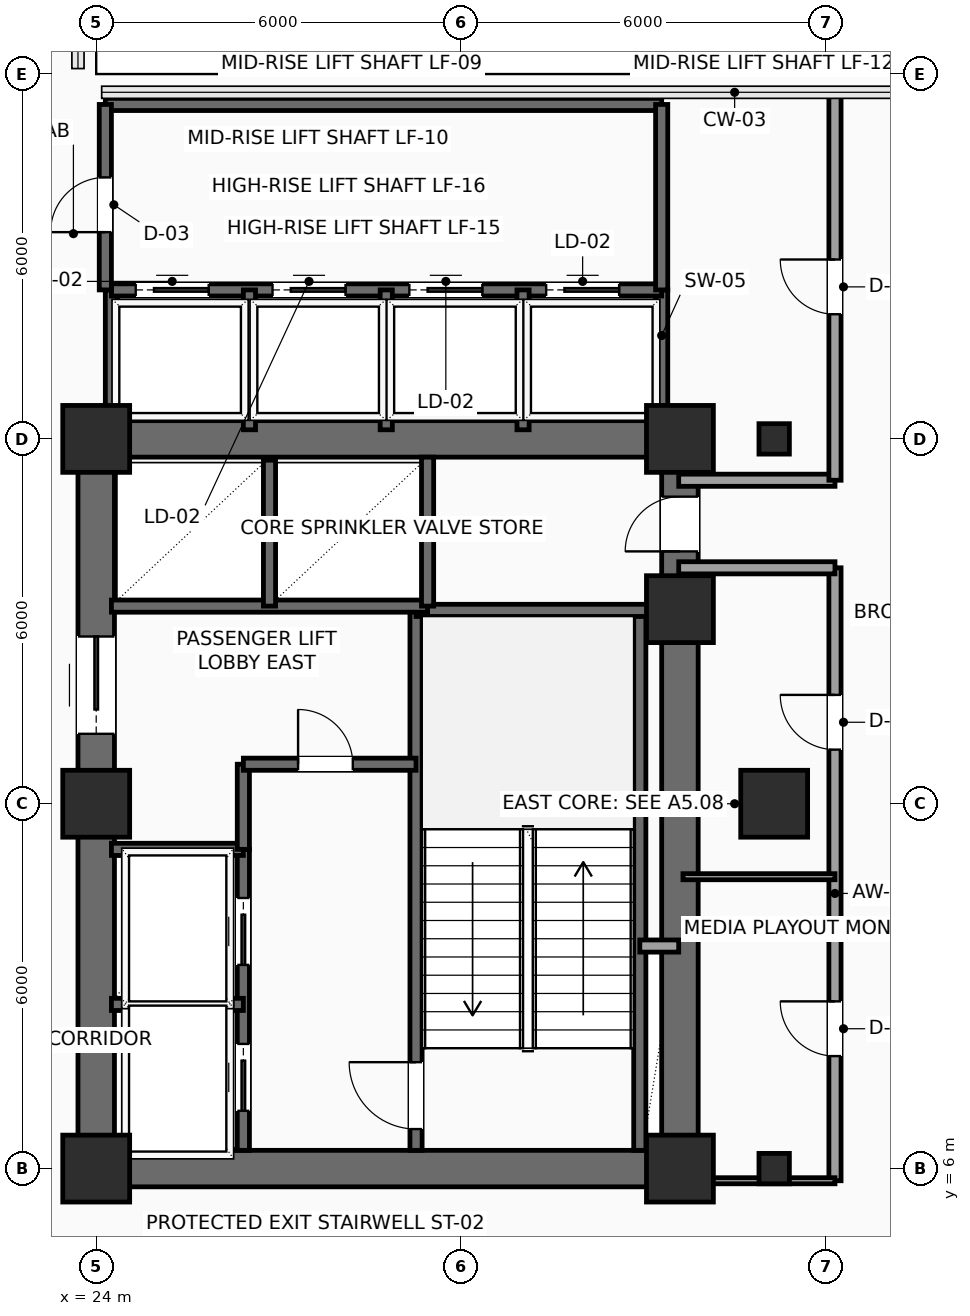
"""IFC4 building model, lengths in metres.
Left out: names, types, materials, properties, quantities, classifications, styles, units other than length and angle.
Written with IfcOpenShell. Run it as: python <this file> out.ifc"""

import sys

from ifc_helpers import new_model, si_unit, direction, frame, frame_2d, origin, origin_2d, place, context, subcontext, project, spatial, rectangle, hollow_rectangle, extrude, element, fill, save


model = new_model("IFC4")
c1 = context("Model", 3, precision=1e-05, world=origin(), true_north=direction((0.0, 1.0)))
c2 = subcontext(c1, "Body", "Model", "MODEL_VIEW")
j1 = project(units=[si_unit("LENGTHUNIT", "METRE"), si_unit("PLANEANGLEUNIT", "RADIAN")], contexts=[c1])
p1 = place(None, origin())
s1 = spatial("IfcSite", under=j1, at=p1, CompositionType="ELEMENT")
p2 = place(p1, origin())
s2 = spatial("IfcBuilding", under=s1, at=p2, CompositionType="ELEMENT")
p3 = place(p2, frame((0.0, 0.0, 141.9)))
s3 = spatial("IfcBuildingStorey", under=s2, at=p3, CompositionType="ELEMENT", Elevation=141.9)
for number, where, z_axis, x_axis in (
    (1, (24.0, 6.0, 0.0), (0.0, 0.0, 1.0), (1.0, 0.0, 0.0)),
    (2, (24.0, 12.0, 0.0), (0.0, 0.0, 1.0), (1.0, 0.0, 0.0)),
    (3, (24.0, 18.0, 0.0), (0.0, 0.0, 1.0), (1.0, 0.0, 0.0)),
    (4, (33.6, 6.0, 0.0), (0.0, 0.0, 1.0), (1.0, 0.0, 0.0)),
    (5, (33.6, 15.2, 0.0), (0.0, 0.0, 1.0), (1.0, 0.0, 0.0)),
    (6, (33.6, 18.0, 0.0), (0.0, 0.0, 1.0), (1.0, 0.0, 0.0)),
):
    element("IfcColumn", number, at=place(p3, frame(where, z_axis=z_axis, x_axis=x_axis)), inside=s3, PredefinedType="COLUMN", context=c2, shape_type="SweptSolid", body=[
        extrude(rectangle(XDim=1.1, YDim=1.1, at=origin_2d()), origin(), (0.0, 0.0, 1.0), 3.75),
    ])
p4 = place(p3, frame((35.15, 6.0, 0.0), z_axis=(0.0, 0.0, 1.0), x_axis=(1.0, 0.0, 0.0)))
e7 = element("IfcColumn", 7, at=p4, inside=s3, PredefinedType="COLUMN", context=c2, shape_type="SweptSolid", body=[
    extrude(hollow_rectangle(XDim=0.5, YDim=0.5, WallThickness=0.025, InnerFilletRadius=0.025, OuterFilletRadius=0.04, at=origin_2d()), origin(), (0.0, 0.0, 1.0), 3.75),
])
p5 = place(p3, frame((35.15, 12.0, 0.0), z_axis=(0.0, 0.0, 1.0), x_axis=(1.0, 0.0, 0.0)))
e8 = element("IfcColumn", 8, at=p5, inside=s3, PredefinedType="COLUMN", context=c2, shape_type="SweptSolid", body=[
    extrude(rectangle(XDim=1.1, YDim=1.1, at=origin_2d()), origin(), (0.0, 0.0, 1.0), 3.75),
])
p6 = place(p3, frame((35.15, 18.0, 0.0), z_axis=(0.0, 0.0, 1.0), x_axis=(1.0, 0.0, 0.0)))
e9 = element("IfcColumn", 9, at=p6, inside=s3, PredefinedType="COLUMN", context=c2, shape_type="SweptSolid", body=[
    extrude(hollow_rectangle(XDim=0.5, YDim=0.5, WallThickness=0.025, InnerFilletRadius=0.025, OuterFilletRadius=0.04, at=origin_2d()), origin(), (0.0, 0.0, 1.0), 3.75),
])
for number, where, z_axis, x_axis in (
    (10, (24.0, 6.0, 0.0), (0.0, 0.0, 1.0), (1.0, 0.0, 0.0)),
    (11, (24.0, 18.0, 0.0), (0.0, 0.0, 1.0), (1.0, 0.0, 0.0)),
):
    element("IfcWall", number, at=place(p3, frame(where, z_axis=z_axis, x_axis=x_axis)), inside=s3, PredefinedType="SHEAR", context=c2, shape_type="SweptSolid", body=[
        extrude(rectangle(XDim=9.6, YDim=0.6, at=frame_2d((4.8, 0.0))), origin(), (0.0, 0.0, 1.0), 3.525),
    ])
p7 = place(p3, frame((24.0, 6.0, 0.0), z_axis=(0.0, 0.0, 1.0), x_axis=(0.0, 1.0, 0.0)))
e12 = element("IfcWall", 12, at=p7, inside=s3, PredefinedType="SHEAR", context=c2, shape_type="SweptSolid", body=[
    extrude(rectangle(XDim=12.0, YDim=0.6, at=frame_2d((6.0, 0.0))), origin(), (0.0, 0.0, 1.0), 3.525),
])
p8 = place(p7, frame((7.15, 0.0, 0.0)))
e13 = element("IfcOpeningElement", 13, at=p8, cuts=e12, PredefinedType="OPENING", context=c2, shape_type="SweptSolid", body=[
    extrude(rectangle(XDim=1.6, YDim=2.3, at=frame_2d((0.8, 1.15))), frame((0.0, 0.31, 0.0), z_axis=(0.0, -1.0, 0.0), x_axis=(1.0, 0.0, 0.0)), (0.0, 0.0, 1.0), 0.62),
])
p9 = place(p3, frame((33.6, 6.0, 0.0), z_axis=(0.0, 0.0, 1.0), x_axis=(0.0, 1.0, 0.0)))
e14 = element("IfcWall", 14, at=p9, inside=s3, PredefinedType="SHEAR", context=c2, shape_type="SweptSolid", body=[
    extrude(rectangle(XDim=12.0, YDim=0.6, at=frame_2d((6.0, 0.0))), origin(), (0.0, 0.0, 1.0), 3.525),
])
p10 = place(p9, frame((10.15, 0.0, 0.0)))
e15 = element("IfcOpeningElement", 15, at=p10, cuts=e14, PredefinedType="OPENING", context=c2, shape_type="SweptSolid", body=[
    extrude(rectangle(XDim=0.9, YDim=2.15, at=frame_2d((0.45, 1.075))), frame((0.0, 0.31, 0.0), z_axis=(0.0, -1.0, 0.0), x_axis=(1.0, 0.0, 0.0)), (0.0, 0.0, 1.0), 0.62),
])
p11 = place(p3, frame((29.26, 6.3, 0.0), z_axis=(0.0, 0.0, 1.0), x_axis=(0.0, 1.0, 0.0)))
e16 = element("IfcWall", 16, at=p11, inside=s3, PredefinedType="SHEAR", context=c2, shape_type="SweptSolid", body=[
    extrude(rectangle(XDim=8.88, YDim=0.2, at=frame_2d((4.44, 0.0))), origin(), (0.0, 0.0, 1.0), 3.525),
])
p12 = place(p11, frame((0.35, 0.0, 0.0)))
e17 = element("IfcOpeningElement", 17, at=p12, cuts=e16, PredefinedType="OPENING", context=c2, shape_type="SweptSolid", body=[
    extrude(rectangle(XDim=1.1, YDim=2.2, at=frame_2d((0.55, 1.1))), frame((0.0, 0.11, 0.0), z_axis=(0.0, -1.0, 0.0), x_axis=(1.0, 0.0, 0.0)), (0.0, 0.0, 1.0), 0.22),
])
p13 = place(p3, frame((32.94, 6.3, 0.0), z_axis=(0.0, 0.0, 1.0), x_axis=(0.0, 1.0, 0.0)))
e18 = element("IfcWall", 18, at=p13, inside=s3, PredefinedType="SHEAR", context=c2, shape_type="SweptSolid", body=[
    extrude(rectangle(XDim=8.88, YDim=0.2, at=frame_2d((4.44, 0.0))), origin(), (0.0, 0.0, 1.0), 3.525),
])
p14 = place(p3, frame((29.26, 15.18, 0.0), z_axis=(0.0, 0.0, 1.0), x_axis=(1.0, 0.0, 0.0)))
e19 = element("IfcWall", 19, at=p14, inside=s3, PredefinedType="SHEAR", context=c2, shape_type="SweptSolid", body=[
    extrude(rectangle(XDim=4.04, YDim=0.2, at=frame_2d((2.02, 0.0))), origin(), (0.0, 0.0, 1.0), 3.525),
])
p15 = place(p3, frame((26.42, 6.3, 0.0), z_axis=(0.0, 0.0, 1.0), x_axis=(0.0, 1.0, 0.0)))
e20 = element("IfcWall", 20, at=p15, inside=s3, PredefinedType="SHEAR", context=c2, shape_type="SweptSolid", body=[
    extrude(rectangle(XDim=4.95, YDim=0.2, at=frame_2d((2.475, 0.0))), origin(), (0.0, 0.0, 1.0), 3.525),
])
p16 = place(p15, frame((0.65, 0.0, 0.0)))
e21 = element("IfcOpeningElement", 21, at=p16, cuts=e20, PredefinedType="OPENING", context=c2, shape_type="SweptSolid", body=[
    extrude(rectangle(XDim=1.1, YDim=2.2, at=frame_2d((0.55, 1.1))), frame((0.0, 0.11, 0.0), z_axis=(0.0, -1.0, 0.0), x_axis=(1.0, 0.0, 0.0)), (0.0, 0.0, 1.0), 0.22),
])
p17 = place(p15, frame((3.05, 0.0, 0.0)))
e22 = element("IfcOpeningElement", 22, at=p17, cuts=e20, PredefinedType="OPENING", context=c2, shape_type="SweptSolid", body=[
    extrude(rectangle(XDim=1.1, YDim=2.2, at=frame_2d((0.55, 1.1))), frame((0.0, 0.11, 0.0), z_axis=(0.0, -1.0, 0.0), x_axis=(1.0, 0.0, 0.0)), (0.0, 0.0, 1.0), 0.22),
])
for number, where, z_axis, x_axis in (
    (23, (24.25, 8.7, 0.0), (0.0, 0.0, 1.0), (1.0, 0.0, 0.0)),
    (24, (24.25, 11.25, 0.0), (0.0, 0.0, 1.0), (1.0, 0.0, 0.0)),
):
    element("IfcWall", number, at=place(p3, frame(where, z_axis=z_axis, x_axis=x_axis)), inside=s3, PredefinedType="SHEAR", context=c2, shape_type="SweptSolid", body=[
        extrude(rectangle(XDim=2.17, YDim=0.2, at=frame_2d((1.085, 0.0))), origin(), (0.0, 0.0, 1.0), 3.525),
    ])
p18 = place(p3, frame((26.42, 11.25, 0.0), z_axis=(0.0, 0.0, 1.0), x_axis=(0.0, 1.0, 0.0)))
e25 = element("IfcWall", 25, at=p18, inside=s3, PredefinedType="SHEAR", context=c2, shape_type="SweptSolid", body=[
    extrude(rectangle(XDim=1.4, YDim=0.2, at=frame_2d((0.7, 0.0))), origin(), (0.0, 0.0, 1.0), 3.525),
])
p19 = place(p3, frame((26.42, 12.65, 0.0), z_axis=(0.0, 0.0, 1.0), x_axis=(1.0, 0.0, 0.0)))
e26 = element("IfcWall", 26, at=p19, inside=s3, PredefinedType="SHEAR", context=c2, shape_type="SweptSolid", body=[
    extrude(rectangle(XDim=2.84, YDim=0.2, at=frame_2d((1.42, 0.0))), origin(), (0.0, 0.0, 1.0), 3.525),
])
p20 = place(p19, frame((0.9, 0.0, 0.0)))
e27 = element("IfcOpeningElement", 27, at=p20, cuts=e26, PredefinedType="OPENING", context=c2, shape_type="SweptSolid", body=[
    extrude(rectangle(XDim=0.9, YDim=2.15, at=frame_2d((0.45, 1.075))), frame((0.0, 0.11, 0.0), z_axis=(0.0, -1.0, 0.0), x_axis=(1.0, 0.0, 0.0)), (0.0, 0.0, 1.0), 0.22),
])
p21 = place(p3, frame((32.94, 9.66, 0.0), z_axis=(0.0, 0.0, 1.0), x_axis=(1.0, 0.0, 0.0)))
e28 = element("IfcWall", 28, at=p21, inside=s3, PredefinedType="SOLIDWALL", context=c2, shape_type="SweptSolid", body=[
    extrude(rectangle(XDim=0.64, YDim=0.2, at=frame_2d((0.32, 0.0))), origin(), (0.0, 0.0, 1.0), 3.525),
])
p22 = place(p3, frame((24.25, 15.25, 0.0), z_axis=(0.0, 0.0, 1.0), x_axis=(1.0, 0.0, 0.0)))
e29 = element("IfcWall", 29, at=p22, inside=s3, PredefinedType="SHEAR", context=c2, shape_type="SweptSolid", body=[
    extrude(rectangle(XDim=5.2, YDim=0.2, at=frame_2d((2.6, 0.0))), origin(), (0.0, 0.0, 1.0), 3.525),
])
p23 = place(p3, frame((26.85, 15.25, 0.0), z_axis=(0.0, 0.0, 1.0), x_axis=(0.0, 1.0, 0.0)))
e30 = element("IfcWall", 30, at=p23, inside=s3, PredefinedType="SHEAR", context=c2, shape_type="SweptSolid", body=[
    extrude(rectangle(XDim=2.4, YDim=0.2, at=frame_2d((1.2, 0.0))), origin(), (0.0, 0.0, 1.0), 3.525),
])
p24 = place(p3, frame((29.45, 15.25, 0.0), z_axis=(0.0, 0.0, 1.0), x_axis=(0.0, 1.0, 0.0)))
e31 = element("IfcWall", 31, at=p24, inside=s3, PredefinedType="SHEAR", context=c2, shape_type="SweptSolid", body=[
    extrude(rectangle(XDim=2.45, YDim=0.2, at=frame_2d((1.225, 0.0))), origin(), (0.0, 0.0, 1.0), 3.525),
])
for number, where, z_axis, x_axis in (
    (32, (33.3, 18.1, 0.0), (0.0, 0.0, 1.0), (0.0, 1.0, 0.0)),
    (33, (24.25, 18.1, 0.0), (0.0, 0.0, 1.0), (0.0, 1.0, 0.0)),
):
    element("IfcWall", number, at=place(p3, frame(where, z_axis=z_axis, x_axis=x_axis)), inside=s3, PredefinedType="SHEAR", context=c2, shape_type="SweptSolid", body=[
        extrude(rectangle(XDim=2.35, YDim=0.2, at=frame_2d((1.175, 0.0))), origin(), (0.0, 0.0, 1.0), 3.525),
    ])
p25 = place(p3, frame((24.25, 20.45, 0.0), z_axis=(0.0, 0.0, 1.0), x_axis=(1.0, 0.0, 0.0)))
e34 = element("IfcWall", 34, at=p25, inside=s3, PredefinedType="SHEAR", context=c2, shape_type="SweptSolid", body=[
    extrude(rectangle(XDim=9.05, YDim=0.2, at=frame_2d((4.525, 0.0))), origin(), (0.0, 0.0, 1.0), 3.525),
])
p26 = place(p25, frame((0.4, 0.0, 0.0)))
e35 = element("IfcOpeningElement", 35, at=p26, cuts=e34, PredefinedType="OPENING", context=c2, shape_type="SweptSolid", body=[
    extrude(rectangle(XDim=1.2, YDim=2.2, at=frame_2d((0.6, 1.1))), frame((0.0, 0.11, 0.0), z_axis=(0.0, -1.0, 0.0), x_axis=(1.0, 0.0, 0.0)), (0.0, 0.0, 1.0), 0.22),
])
p27 = place(p25, frame((2.65, 0.0, 0.0)))
e36 = element("IfcOpeningElement", 36, at=p27, cuts=e34, PredefinedType="OPENING", context=c2, shape_type="SweptSolid", body=[
    extrude(rectangle(XDim=1.2, YDim=2.2, at=frame_2d((0.6, 1.1))), frame((0.0, 0.11, 0.0), z_axis=(0.0, -1.0, 0.0), x_axis=(1.0, 0.0, 0.0)), (0.0, 0.0, 1.0), 0.22),
])
p28 = place(p25, frame((4.9, 0.0, 0.0)))
e37 = element("IfcOpeningElement", 37, at=p28, cuts=e34, PredefinedType="OPENING", context=c2, shape_type="SweptSolid", body=[
    extrude(rectangle(XDim=1.2, YDim=2.2, at=frame_2d((0.6, 1.1))), frame((0.0, 0.11, 0.0), z_axis=(0.0, -1.0, 0.0), x_axis=(1.0, 0.0, 0.0)), (0.0, 0.0, 1.0), 0.22),
])
p29 = place(p25, frame((7.15, 0.0, 0.0)))
e38 = element("IfcOpeningElement", 38, at=p29, cuts=e34, PredefinedType="OPENING", context=c2, shape_type="SweptSolid", body=[
    extrude(rectangle(XDim=1.2, YDim=2.2, at=frame_2d((0.6, 1.1))), frame((0.0, 0.11, 0.0), z_axis=(0.0, -1.0, 0.0), x_axis=(1.0, 0.0, 0.0)), (0.0, 0.0, 1.0), 0.22),
])
for number, where, z_axis, x_axis in (
    (39, (26.52, 18.15, 0.0), (0.0, 0.0, 1.0), (0.0, 1.0, 0.0)),
    (40, (28.77, 18.15, 0.0), (0.0, 0.0, 1.0), (0.0, 1.0, 0.0)),
    (41, (31.02, 18.15, 0.0), (0.0, 0.0, 1.0), (0.0, 1.0, 0.0)),
):
    element("IfcWall", number, at=place(p3, frame(where, z_axis=z_axis, x_axis=x_axis)), inside=s3, PredefinedType="SHEAR", context=c2, shape_type="SweptSolid", body=[
        extrude(rectangle(XDim=2.3, YDim=0.2, at=frame_2d((1.15, 0.0))), origin(), (0.0, 0.0, 1.0), 3.525),
    ])
p30 = place(p3, frame((24.15, 23.5, 0.0), z_axis=(0.0, 0.0, 1.0), x_axis=(1.0, 0.0, 0.0)))
e42 = element("IfcWall", 42, at=p30, inside=s3, PredefinedType="SHEAR", context=c2, shape_type="SweptSolid", body=[
    extrude(rectangle(XDim=9.15, YDim=0.2, at=frame_2d((4.575, 0.0))), origin(), (0.0, 0.0, 1.0), 3.525),
])
p31 = place(p3, frame((33.3, 20.45, 0.0), z_axis=(0.0, 0.0, 1.0), x_axis=(0.0, 1.0, 0.0)))
e43 = element("IfcWall", 43, at=p31, inside=s3, PredefinedType="SHEAR", context=c2, shape_type="SweptSolid", body=[
    extrude(rectangle(XDim=3.05, YDim=0.2, at=frame_2d((1.525, 0.0))), origin(), (0.0, 0.0, 1.0), 3.525),
])
p32 = place(p3, frame((24.15, 20.45, 0.0), z_axis=(0.0, 0.0, 1.0), x_axis=(0.0, 1.0, 0.0)))
e44 = element("IfcWall", 44, at=p32, inside=s3, PredefinedType="SHEAR", context=c2, shape_type="SweptSolid", body=[
    extrude(rectangle(XDim=3.05, YDim=0.2, at=frame_2d((1.525, 0.0))), origin(), (0.0, 0.0, 1.0), 3.525),
])
p33 = place(p32, frame((0.95, 0.0, 0.0)))
e45 = element("IfcOpeningElement", 45, at=p33, cuts=e44, PredefinedType="OPENING", context=c2, shape_type="SweptSolid", body=[
    extrude(rectangle(XDim=0.9, YDim=2.15, at=frame_2d((0.45, 1.075))), frame((0.0, 0.11, 0.0), z_axis=(0.0, -1.0, 0.0), x_axis=(1.0, 0.0, 0.0)), (0.0, 0.0, 1.0), 0.22),
])
p34 = place(p3, frame((36.15, 5.8, 0.0), z_axis=(0.0, 0.0, 1.0), x_axis=(0.0, 1.0, 0.0)))
e46 = element("IfcWall", 46, at=p34, inside=s3, PredefinedType="PARTITIONING", context=c2, shape_type="SweptSolid", body=[
    extrude(rectangle(XDim=10.08, YDim=0.2, at=frame_2d((5.04, 0.0))), origin(), (0.0, 0.0, 1.0), 3.525),
])
p35 = place(p34, frame((2.05, 0.0, 0.0)))
e47 = element("IfcOpeningElement", 47, at=p35, cuts=e46, PredefinedType="OPENING", context=c2, shape_type="SweptSolid", body=[
    extrude(rectangle(XDim=0.9, YDim=2.1, at=frame_2d((0.45, 1.05))), frame((0.0, 0.11, 0.0), z_axis=(0.0, -1.0, 0.0), x_axis=(1.0, 0.0, 0.0)), (0.0, 0.0, 1.0), 0.22),
])
p36 = place(p34, frame((7.09, 0.0, 0.0)))
e48 = element("IfcOpeningElement", 48, at=p36, cuts=e46, PredefinedType="OPENING", context=c2, shape_type="SweptSolid", body=[
    extrude(rectangle(XDim=0.9, YDim=2.1, at=frame_2d((0.45, 1.05))), frame((0.0, 0.11, 0.0), z_axis=(0.0, -1.0, 0.0), x_axis=(1.0, 0.0, 0.0)), (0.0, 0.0, 1.0), 0.22),
])
for number, where, z_axis, x_axis in (
    (49, (36.15, 15.88, 0.0), (0.0, 0.0, 1.0), (-1.0, 0.0, 0.0)),
    (50, (33.58, 17.32, 0.0), (0.0, 0.0, 1.0), (1.0, 0.0, 0.0)),
):
    element("IfcWall", number, at=place(p3, frame(where, z_axis=z_axis, x_axis=x_axis)), inside=s3, PredefinedType="PARTITIONING", context=c2, shape_type="SweptSolid", body=[
        extrude(rectangle(XDim=2.57, YDim=0.2, at=frame_2d((1.285, 0.0))), origin(), (0.0, 0.0, 1.0), 3.525),
    ])
p37 = place(p3, frame((36.15, 17.32, 0.0), z_axis=(0.0, 0.0, 1.0), x_axis=(0.0, 1.0, 0.0)))
e51 = element("IfcWall", 51, at=p37, inside=s3, PredefinedType="PARTITIONING", context=c2, shape_type="SweptSolid", body=[
    extrude(rectangle(XDim=6.38, YDim=0.2, at=frame_2d((3.19, 0.0))), origin(), (0.0, 0.0, 1.0), 3.525),
])
p38 = place(p37, frame((2.73, 0.0, 0.0)))
e52 = element("IfcOpeningElement", 52, at=p38, cuts=e51, PredefinedType="OPENING", context=c2, shape_type="SweptSolid", body=[
    extrude(rectangle(XDim=0.9, YDim=2.1, at=frame_2d((0.45, 1.05))), frame((0.0, 0.11, 0.0), z_axis=(0.0, -1.0, 0.0), x_axis=(1.0, 0.0, 0.0)), (0.0, 0.0, 1.0), 0.22),
])
p39 = place(p3, frame((33.65, 5.8, 0.0), z_axis=(0.0, 0.0, 1.0), x_axis=(1.0, 0.0, 0.0)))
e53 = element("IfcWall", 53, at=p39, inside=s3, PredefinedType="PARTITIONING", context=c2, shape_type="SweptSolid", body=[
    extrude(rectangle(XDim=2.5, YDim=0.1, at=frame_2d((1.25, 0.0))), origin(), (0.0, 0.0, 1.0), 3.017),
])
p40 = place(p3, frame((33.65, 10.8, 0.0), z_axis=(0.0, 0.0, 1.0), x_axis=(1.0, 0.0, 0.0)))
e54 = element("IfcWall", 54, at=p40, inside=s3, PredefinedType="PARTITIONING", context=c2, shape_type="SweptSolid", body=[
    extrude(rectangle(XDim=2.5, YDim=0.1, at=frame_2d((1.25, 0.0))), origin(), (0.0, 0.0, 1.0), 3.525),
])
p41 = place(p8, origin())
e55 = element("IfcDoor", 55, at=p41, inside=s3, OperationType="DOUBLE_DOOR_SLIDING", PredefinedType="DOOR", context=c2, shape_type="SweptSolid", body=[
    extrude(rectangle(XDim=1.6, YDim=2.3, at=frame_2d((0.8, 1.15))), frame((0.0, 0.025, 0.0), z_axis=(0.0, -1.0, 0.0), x_axis=(1.0, 0.0, 0.0)), (0.0, 0.0, 1.0), 0.05),
])
fill(e13, e55)
p42 = place(p10, origin())
e56 = element("IfcDoor", 56, at=p42, inside=s3, OperationType="SINGLE_SWING_LEFT", PredefinedType="DOOR", context=c2, shape_type="SweptSolid", body=[
    extrude(rectangle(XDim=0.9, YDim=2.15, at=frame_2d((0.45, 1.075))), frame((0.0, 0.025, 0.0), z_axis=(0.0, -1.0, 0.0), x_axis=(1.0, 0.0, 0.0)), (0.0, 0.0, 1.0), 0.05),
])
fill(e15, e56)
p43 = place(p12, origin())
e57 = element("IfcDoor", 57, at=p43, inside=s3, OperationType="SINGLE_SWING_RIGHT", PredefinedType="DOOR", context=c2, shape_type="SweptSolid", body=[
    extrude(rectangle(XDim=1.1, YDim=2.2, at=frame_2d((0.55, 1.1))), frame((0.0, 0.025, 0.0), z_axis=(0.0, -1.0, 0.0), x_axis=(1.0, 0.0, 0.0)), (0.0, 0.0, 1.0), 0.05),
])
fill(e17, e57)
p44 = place(p16, origin())
e58 = element("IfcDoor", 58, at=p44, inside=s3, OperationType="SLIDING_TO_LEFT", PredefinedType="DOOR", context=c2, shape_type="SweptSolid", body=[
    extrude(rectangle(XDim=1.1, YDim=2.2, at=frame_2d((0.55, 1.1))), frame((0.0, 0.025, 0.0), z_axis=(0.0, -1.0, 0.0), x_axis=(1.0, 0.0, 0.0)), (0.0, 0.0, 1.0), 0.05),
])
fill(e21, e58)
p45 = place(p17, origin())
e59 = element("IfcDoor", 59, at=p45, inside=s3, OperationType="SLIDING_TO_LEFT", PredefinedType="DOOR", context=c2, shape_type="SweptSolid", body=[
    extrude(rectangle(XDim=1.1, YDim=2.2, at=frame_2d((0.55, 1.1))), frame((0.0, 0.025, 0.0), z_axis=(0.0, -1.0, 0.0), x_axis=(1.0, 0.0, 0.0)), (0.0, 0.0, 1.0), 0.05),
])
fill(e22, e59)
p46 = place(p20, origin())
e60 = element("IfcDoor", 60, at=p46, inside=s3, OperationType="SINGLE_SWING_LEFT", PredefinedType="DOOR", context=c2, shape_type="SweptSolid", body=[
    extrude(rectangle(XDim=0.9, YDim=2.15, at=frame_2d((0.45, 1.075))), frame((0.0, 0.025, 0.0), z_axis=(0.0, -1.0, 0.0), x_axis=(1.0, 0.0, 0.0)), (0.0, 0.0, 1.0), 0.05),
])
fill(e27, e60)
p47 = place(p26, origin())
e61 = element("IfcDoor", 61, at=p47, inside=s3, OperationType="SLIDING_TO_RIGHT", PredefinedType="DOOR", context=c2, shape_type="SweptSolid", body=[
    extrude(rectangle(XDim=1.2, YDim=2.2, at=frame_2d((0.6, 1.1))), frame((0.0, 0.025, 0.0), z_axis=(0.0, -1.0, 0.0), x_axis=(1.0, 0.0, 0.0)), (0.0, 0.0, 1.0), 0.05),
])
fill(e35, e61)
p48 = place(p27, origin())
e62 = element("IfcDoor", 62, at=p48, inside=s3, OperationType="SLIDING_TO_RIGHT", PredefinedType="DOOR", context=c2, shape_type="SweptSolid", body=[
    extrude(rectangle(XDim=1.2, YDim=2.2, at=frame_2d((0.6, 1.1))), frame((0.0, 0.025, 0.0), z_axis=(0.0, -1.0, 0.0), x_axis=(1.0, 0.0, 0.0)), (0.0, 0.0, 1.0), 0.05),
])
fill(e36, e62)
p49 = place(p28, origin())
e63 = element("IfcDoor", 63, at=p49, inside=s3, OperationType="SLIDING_TO_RIGHT", PredefinedType="DOOR", context=c2, shape_type="SweptSolid", body=[
    extrude(rectangle(XDim=1.2, YDim=2.2, at=frame_2d((0.6, 1.1))), frame((0.0, 0.025, 0.0), z_axis=(0.0, -1.0, 0.0), x_axis=(1.0, 0.0, 0.0)), (0.0, 0.0, 1.0), 0.05),
])
fill(e37, e63)
p50 = place(p29, origin())
e64 = element("IfcDoor", 64, at=p50, inside=s3, OperationType="SLIDING_TO_RIGHT", PredefinedType="DOOR", context=c2, shape_type="SweptSolid", body=[
    extrude(rectangle(XDim=1.2, YDim=2.2, at=frame_2d((0.6, 1.1))), frame((0.0, 0.025, 0.0), z_axis=(0.0, -1.0, 0.0), x_axis=(1.0, 0.0, 0.0)), (0.0, 0.0, 1.0), 0.05),
])
fill(e38, e64)
p51 = place(p33, origin())
e65 = element("IfcDoor", 65, at=p51, inside=s3, OperationType="SINGLE_SWING_LEFT", PredefinedType="DOOR", context=c2, shape_type="SweptSolid", body=[
    extrude(rectangle(XDim=0.9, YDim=2.15, at=frame_2d((0.45, 1.075))), frame((0.0, 0.025, 0.0), z_axis=(0.0, -1.0, 0.0), x_axis=(1.0, 0.0, 0.0)), (0.0, 0.0, 1.0), 0.05),
])
fill(e45, e65)
p52 = place(p35, origin())
e66 = element("IfcDoor", 66, at=p52, inside=s3, OperationType="SINGLE_SWING_RIGHT", PredefinedType="DOOR", context=c2, shape_type="SweptSolid", body=[
    extrude(rectangle(XDim=0.9, YDim=2.1, at=frame_2d((0.45, 1.05))), frame((0.0, 0.025, 0.0), z_axis=(0.0, -1.0, 0.0), x_axis=(1.0, 0.0, 0.0)), (0.0, 0.0, 1.0), 0.05),
])
fill(e47, e66)
p53 = place(p36, origin())
e67 = element("IfcDoor", 67, at=p53, inside=s3, OperationType="SINGLE_SWING_RIGHT", PredefinedType="DOOR", context=c2, shape_type="SweptSolid", body=[
    extrude(rectangle(XDim=0.9, YDim=2.1, at=frame_2d((0.45, 1.05))), frame((0.0, 0.025, 0.0), z_axis=(0.0, -1.0, 0.0), x_axis=(1.0, 0.0, 0.0)), (0.0, 0.0, 1.0), 0.05),
])
fill(e48, e67)
p54 = place(p38, origin())
e68 = element("IfcDoor", 68, at=p54, inside=s3, OperationType="SINGLE_SWING_RIGHT", PredefinedType="DOOR", context=c2, shape_type="SweptSolid", body=[
    extrude(rectangle(XDim=0.9, YDim=2.1, at=frame_2d((0.45, 1.05))), frame((0.0, 0.025, 0.0), z_axis=(0.0, -1.0, 0.0), x_axis=(1.0, 0.0, 0.0)), (0.0, 0.0, 1.0), 0.05),
])
fill(e52, e68)
save(model, sys.argv[1])
